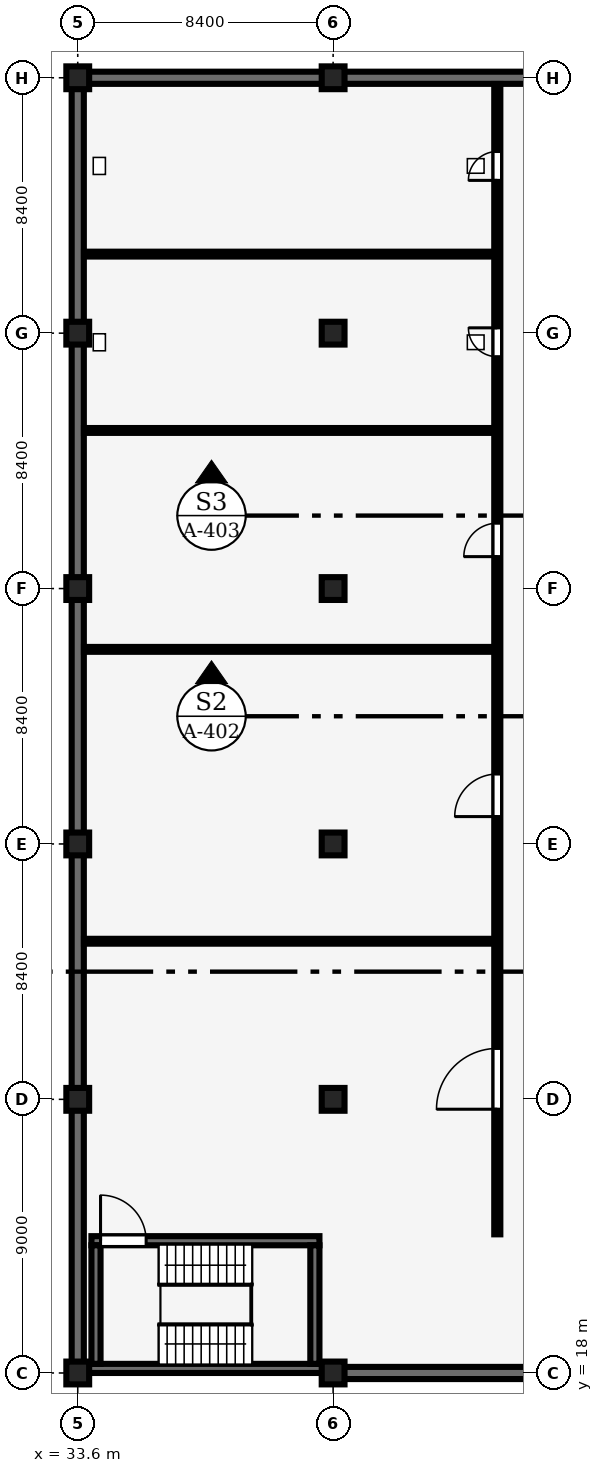
"""IFC4 building model, lengths in metres.
Left out: names, types, materials, properties, quantities, classifications, styles, units other than length and angle.
Written with IfcOpenShell. Run it as: python <this file> out.ifc"""

import sys

from ifc_helpers import new_model, si_unit, direction, frame, frame_2d, origin, origin_2d, place, context, subcontext, project, spatial, rectangle, extrude, element, fill, save


model = new_model("IFC4")
c1 = context("Model", 3, precision=1e-05, world=origin(), true_north=direction((0.0, 1.0)))
c2 = subcontext(c1, "Body", "Model", "MODEL_VIEW")
j1 = project(units=[si_unit("LENGTHUNIT", "METRE"), si_unit("PLANEANGLEUNIT", "RADIAN")], contexts=[c1])
p1 = place(None, origin())
s1 = spatial("IfcSite", under=j1, at=p1, CompositionType="ELEMENT")
p2 = place(p1, origin())
s2 = spatial("IfcBuilding", under=s1, at=p2, CompositionType="ELEMENT")
p3 = place(p2, frame((0.0, 0.0, -4.2)))
s3 = spatial("IfcBuildingStorey", under=s2, at=p3, CompositionType="ELEMENT", Elevation=-4.2)
for number, where, z_axis, x_axis in (
    (1, (33.6, 18.0, 0.0), (0.0, 0.0, 1.0), (1.0, 0.0, 0.0)),
    (2, (33.6, 27.0, 0.0), (0.0, 0.0, 1.0), (1.0, 0.0, 0.0)),
    (3, (33.6, 35.4, 0.0), (0.0, 0.0, 1.0), (1.0, 0.0, 0.0)),
    (4, (33.6, 43.8, 0.0), (0.0, 0.0, 1.0), (1.0, 0.0, 0.0)),
    (5, (33.6, 52.2, 0.0), (0.0, 0.0, 1.0), (1.0, 0.0, 0.0)),
    (6, (33.6, 60.6, 0.0), (0.0, 0.0, 1.0), (1.0, 0.0, 0.0)),
    (7, (42.0, 18.0, 0.0), (0.0, 0.0, 1.0), (1.0, 0.0, 0.0)),
    (8, (42.0, 27.0, 0.0), (0.0, 0.0, 1.0), (1.0, 0.0, 0.0)),
    (9, (42.0, 35.4, 0.0), (0.0, 0.0, 1.0), (1.0, 0.0, 0.0)),
    (10, (42.0, 43.8, 0.0), (0.0, 0.0, 1.0), (1.0, 0.0, 0.0)),
    (11, (42.0, 52.2, 0.0), (0.0, 0.0, 1.0), (1.0, 0.0, 0.0)),
    (12, (42.0, 60.6, 0.0), (0.0, 0.0, 1.0), (1.0, 0.0, 0.0)),
):
    element("IfcColumn", number, at=place(p3, frame(where, z_axis=z_axis, x_axis=x_axis)), inside=s3, PredefinedType="COLUMN", context=c2, shape_type="SweptSolid", body=[
        extrude(rectangle(XDim=0.75, YDim=0.75, at=origin_2d()), origin(), (0.0, 0.0, 1.0), 4.2),
    ])
p4 = place(p3, frame((42.35, 18.0, 0.0), z_axis=(0.0, 0.0, 1.0), x_axis=(1.0, 0.0, 0.0)))
e13 = element("IfcWall", 13, at=p4, inside=s3, PredefinedType="SHEAR", context=c2, shape_type="SweptSolid", body=[
    extrude(rectangle(XDim=7.7, YDim=0.4, at=frame_2d((3.85, 0.0))), origin(), (0.0, 0.0, 1.0), 2.95),
])
p5 = place(p3, frame((33.95, 60.6, 0.0), z_axis=(0.0, 0.0, 1.0), x_axis=(1.0, 0.0, 0.0)))
e14 = element("IfcWall", 14, at=p5, inside=s3, PredefinedType="SHEAR", context=c2, shape_type="SweptSolid", body=[
    extrude(rectangle(XDim=7.7, YDim=0.4, at=frame_2d((3.85, 0.0))), origin(), (0.0, 0.0, 1.0), 3.9),
])
p6 = place(p3, frame((42.35, 60.6, 0.0), z_axis=(0.0, 0.0, 1.0), x_axis=(1.0, 0.0, 0.0)))
e15 = element("IfcWall", 15, at=p6, inside=s3, PredefinedType="SHEAR", context=c2, shape_type="SweptSolid", body=[
    extrude(rectangle(XDim=7.7, YDim=0.4, at=frame_2d((3.85, 0.0))), origin(), (0.0, 0.0, 1.0), 3.15),
])
p7 = place(p3, frame((33.6, 18.35, 0.0), z_axis=(0.0, 0.0, 1.0), x_axis=(0.0, 1.0, 0.0)))
e16 = element("IfcWall", 16, at=p7, inside=s3, PredefinedType="SHEAR", context=c2, shape_type="SweptSolid", body=[
    extrude(rectangle(XDim=8.3, YDim=0.4, at=frame_2d((4.15, 0.0))), origin(), (0.0, 0.0, 1.0), 2.7),
])
for number, where, z_axis, x_axis in (
    (17, (33.6, 27.35, 0.0), (0.0, 0.0, 1.0), (0.0, 1.0, 0.0)),
    (18, (33.6, 35.75, 0.0), (0.0, 0.0, 1.0), (0.0, 1.0, 0.0)),
):
    element("IfcWall", number, at=place(p3, frame(where, z_axis=z_axis, x_axis=x_axis)), inside=s3, PredefinedType="SHEAR", context=c2, shape_type="SweptSolid", body=[
        extrude(rectangle(XDim=7.7, YDim=0.4, at=frame_2d((3.85, 0.0))), origin(), (0.0, 0.0, 1.0), 3.25),
    ])
p8 = place(p3, frame((33.6, 44.15, 0.0), z_axis=(0.0, 0.0, 1.0), x_axis=(0.0, 1.0, 0.0)))
e19 = element("IfcWall", 19, at=p8, inside=s3, PredefinedType="SHEAR", context=c2, shape_type="SweptSolid", body=[
    extrude(rectangle(XDim=7.7, YDim=0.4, at=frame_2d((3.85, 0.0))), origin(), (0.0, 0.0, 1.0), 3.2),
])
p9 = place(p3, frame((33.6, 52.55, 0.0), z_axis=(0.0, 0.0, 1.0), x_axis=(0.0, 1.0, 0.0)))
e20 = element("IfcWall", 20, at=p9, inside=s3, PredefinedType="SHEAR", context=c2, shape_type="SweptSolid", body=[
    extrude(rectangle(XDim=7.7, YDim=0.4, at=frame_2d((3.85, 0.0))), origin(), (0.0, 0.0, 1.0), 3.9),
])
p10 = place(p3, frame((33.925, 18.15, 0.0), z_axis=(0.0, 0.0, 1.0), x_axis=(1.0, 0.0, 0.0)))
e21 = element("IfcWall", 21, at=p10, inside=s3, PredefinedType="SHEAR", context=c2, shape_type="SweptSolid", body=[
    extrude(rectangle(XDim=7.75, YDim=0.3, at=frame_2d((3.875, 0.0))), origin(), (0.0, 0.0, 1.0), 4.025),
])
p11 = place(p3, frame((34.05, 22.35, 0.0), z_axis=(0.0, 0.0, 1.0), x_axis=(1.0, 0.0, 0.0)))
e22 = element("IfcWall", 22, at=p11, inside=s3, PredefinedType="SHEAR", context=c2, shape_type="SweptSolid", body=[
    extrude(rectangle(XDim=7.5, YDim=0.3, at=frame_2d((3.75, 0.0))), origin(), (0.0, 0.0, 1.0), 4.025),
])
p12 = place(p11, frame((0.3, 0.0, 0.0)))
e23 = element("IfcOpeningElement", 23, at=p12, cuts=e22, PredefinedType="OPENING", context=c2, shape_type="SweptSolid", body=[
    extrude(rectangle(XDim=1.5, YDim=2.2, at=frame_2d((0.75, 1.1))), frame((0.0, 0.16, 0.0), z_axis=(0.0, -1.0, 0.0), x_axis=(1.0, 0.0, 0.0)), (0.0, 0.0, 1.0), 0.32),
])
for number, where, z_axis, x_axis in (
    (24, (34.2, 18.3, 0.0), (0.0, 0.0, 1.0), (0.0, 1.0, 0.0)),
    (25, (41.4, 18.3, 0.0), (0.0, 0.0, 1.0), (0.0, 1.0, 0.0)),
):
    element("IfcWall", number, at=place(p3, frame(where, z_axis=z_axis, x_axis=x_axis)), inside=s3, PredefinedType="SHEAR", context=c2, shape_type="SweptSolid", body=[
        extrude(rectangle(XDim=3.9, YDim=0.3, at=frame_2d((1.95, 0.0))), origin(), (0.0, 0.0, 1.0), 4.025),
    ])
for number, where, z_axis, x_axis in (
    (26, (33.805, 32.2, 0.0), (0.0, 0.0, 1.0), (1.0, 0.0, 0.0)),
    (27, (33.805, 41.8, 0.0), (0.0, 0.0, 1.0), (1.0, 0.0, 0.0)),
    (28, (33.805, 49.0, 0.0), (0.0, 0.0, 1.0), (1.0, 0.0, 0.0)),
    (29, (33.805, 54.8, 0.0), (0.0, 0.0, 1.0), (1.0, 0.0, 0.0)),
):
    element("IfcWall", number, at=place(p3, frame(where, z_axis=z_axis, x_axis=x_axis)), inside=s3, PredefinedType="PARTITIONING", context=c2, shape_type="SweptSolid", body=[
        extrude(rectangle(XDim=13.49, YDim=0.16, at=frame_2d((6.745, 0.0))), origin(), (0.0, 0.0, 1.0), 3.9),
    ])
p13 = place(p3, frame((47.4, 22.56, 0.0), z_axis=(0.0, 0.0, 1.0), x_axis=(0.0, 1.0, 0.0)))
e30 = element("IfcWall", 30, at=p13, inside=s3, PredefinedType="PARTITIONING", context=c2, shape_type="SweptSolid", body=[
    extrude(rectangle(XDim=37.835, YDim=0.2, at=frame_2d((18.917, 0.0))), origin(), (0.0, 0.0, 1.0), 3.9),
])
p14 = place(p13, frame((4.115, 0.0, 0.0)))
e31 = element("IfcOpeningElement", 31, at=p14, cuts=e30, PredefinedType="OPENING", context=c2, shape_type="SweptSolid", body=[
    extrude(rectangle(XDim=2.0, YDim=2.5, at=frame_2d((1.0, 1.25))), frame((0.0, 0.11, 0.0), z_axis=(0.0, -1.0, 0.0), x_axis=(1.0, 0.0, 0.0)), (0.0, 0.0, 1.0), 0.22),
])
p15 = place(p13, frame((13.74, 0.0, 0.0)))
e32 = element("IfcOpeningElement", 32, at=p15, cuts=e30, PredefinedType="OPENING", context=c2, shape_type="SweptSolid", body=[
    extrude(rectangle(XDim=1.4, YDim=2.2, at=frame_2d((0.7, 1.1))), frame((0.0, 0.11, 0.0), z_axis=(0.0, -1.0, 0.0), x_axis=(1.0, 0.0, 0.0)), (0.0, 0.0, 1.0), 0.22),
])
p16 = place(p13, frame((22.29, 0.0, 0.0)))
e33 = element("IfcOpeningElement", 33, at=p16, cuts=e30, PredefinedType="OPENING", context=c2, shape_type="SweptSolid", body=[
    extrude(rectangle(XDim=1.1, YDim=2.15, at=frame_2d((0.55, 1.075))), frame((0.0, 0.11, 0.0), z_axis=(0.0, -1.0, 0.0), x_axis=(1.0, 0.0, 0.0)), (0.0, 0.0, 1.0), 0.22),
])
p17 = place(p13, frame((28.865, 0.0, 0.0)))
e34 = element("IfcOpeningElement", 34, at=p17, cuts=e30, PredefinedType="OPENING", context=c2, shape_type="SweptSolid", body=[
    extrude(rectangle(XDim=0.95, YDim=2.2, at=frame_2d((0.475, 1.1))), frame((0.0, 0.11, 0.0), z_axis=(0.0, -1.0, 0.0), x_axis=(1.0, 0.0, 0.0)), (0.0, 0.0, 1.0), 0.22),
])
p18 = place(p13, frame((34.665, 0.0, 0.0)))
e35 = element("IfcOpeningElement", 35, at=p18, cuts=e30, PredefinedType="OPENING", context=c2, shape_type="SweptSolid", body=[
    extrude(rectangle(XDim=0.95, YDim=2.2, at=frame_2d((0.475, 1.1))), frame((0.0, 0.11, 0.0), z_axis=(0.0, -1.0, 0.0), x_axis=(1.0, 0.0, 0.0)), (0.0, 0.0, 1.0), 0.22),
])
p19 = place(p12, origin())
e36 = element("IfcDoor", 36, at=p19, inside=s3, OperationType="DOUBLE_DOOR_SINGLE_SWING", PredefinedType="DOOR", context=c2, shape_type="SweptSolid", body=[
    extrude(rectangle(XDim=1.5, YDim=2.2, at=frame_2d((0.75, 1.1))), frame((0.0, 0.025, 0.0), z_axis=(0.0, -1.0, 0.0), x_axis=(1.0, 0.0, 0.0)), (0.0, 0.0, 1.0), 0.05),
])
fill(e23, e36)
p20 = place(p14, origin())
e37 = element("IfcDoor", 37, at=p20, inside=s3, OperationType="DOUBLE_DOOR_SINGLE_SWING", PredefinedType="DOOR", context=c2, shape_type="SweptSolid", body=[
    extrude(rectangle(XDim=2.0, YDim=2.5, at=frame_2d((1.0, 1.25))), frame((0.0, 0.025, 0.0), z_axis=(0.0, -1.0, 0.0), x_axis=(1.0, 0.0, 0.0)), (0.0, 0.0, 1.0), 0.05),
])
fill(e31, e37)
p21 = place(p15, origin())
e38 = element("IfcDoor", 38, at=p21, inside=s3, OperationType="DOUBLE_DOOR_SINGLE_SWING", PredefinedType="DOOR", context=c2, shape_type="SweptSolid", body=[
    extrude(rectangle(XDim=1.4, YDim=2.2, at=frame_2d((0.7, 1.1))), frame((0.0, 0.025, 0.0), z_axis=(0.0, -1.0, 0.0), x_axis=(1.0, 0.0, 0.0)), (0.0, 0.0, 1.0), 0.05),
])
fill(e32, e38)
p22 = place(p16, origin())
e39 = element("IfcDoor", 39, at=p22, inside=s3, OperationType="SINGLE_SWING_LEFT", PredefinedType="DOOR", context=c2, shape_type="SweptSolid", body=[
    extrude(rectangle(XDim=1.1, YDim=2.15, at=frame_2d((0.55, 1.075))), frame((0.0, 0.025, 0.0), z_axis=(0.0, -1.0, 0.0), x_axis=(1.0, 0.0, 0.0)), (0.0, 0.0, 1.0), 0.05),
])
fill(e33, e39)
p23 = place(p17, origin())
e40 = element("IfcDoor", 40, at=p23, inside=s3, OperationType="SINGLE_SWING_RIGHT", PredefinedType="DOOR", context=c2, shape_type="SweptSolid", body=[
    extrude(rectangle(XDim=0.95, YDim=2.2, at=frame_2d((0.475, 1.1))), frame((0.0, 0.025, 0.0), z_axis=(0.0, -1.0, 0.0), x_axis=(1.0, 0.0, 0.0)), (0.0, 0.0, 1.0), 0.05),
])
fill(e34, e40)
p24 = place(p18, origin())
e41 = element("IfcDoor", 41, at=p24, inside=s3, OperationType="SINGLE_SWING_LEFT", PredefinedType="DOOR", context=c2, shape_type="SweptSolid", body=[
    extrude(rectangle(XDim=0.95, YDim=2.2, at=frame_2d((0.475, 1.1))), frame((0.0, 0.025, 0.0), z_axis=(0.0, -1.0, 0.0), x_axis=(1.0, 0.0, 0.0)), (0.0, 0.0, 1.0), 0.05),
])
fill(e35, e41)
save(model, sys.argv[1])
